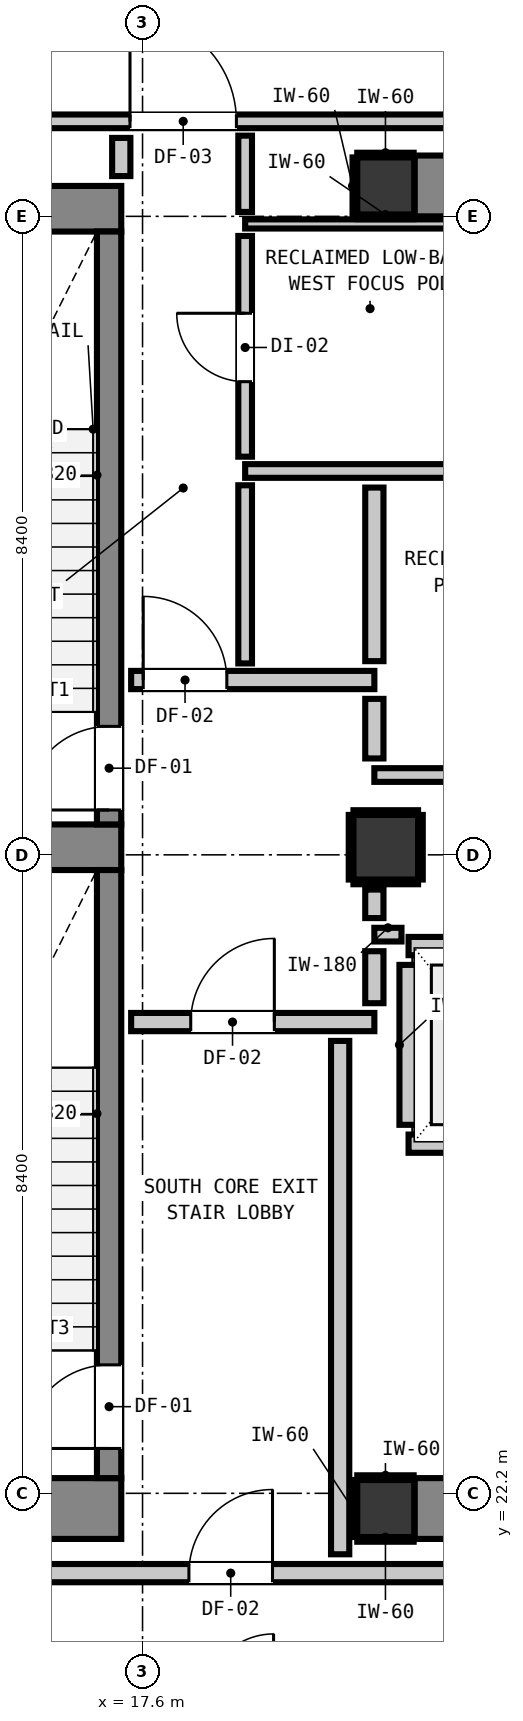
"""IFC4 building model, lengths in metres.
Left out: names, types, materials, properties, quantities, classifications, styles, units other than length and angle.
Written with IfcOpenShell. Run it as: python <this file> out.ifc"""

import sys

from ifc_helpers import new_model, si_unit, direction, frame, frame_2d, origin, origin_2d, place, context, subcontext, project, spatial, rectangle, extrude, element, fill, save


model = new_model("IFC4")
c1 = context("Model", 3, precision=1e-05, world=origin(), true_north=direction((0.0, 1.0)))
c2 = subcontext(c1, "Body", "Model", "MODEL_VIEW")
j1 = project(units=[si_unit("LENGTHUNIT", "METRE"), si_unit("PLANEANGLEUNIT", "RADIAN")], contexts=[c1])
p1 = place(None, origin())
s1 = spatial("IfcSite", under=j1, at=p1, CompositionType="ELEMENT")
p2 = place(p1, origin())
s2 = spatial("IfcBuilding", under=s1, at=p2, CompositionType="ELEMENT")
p3 = place(p2, frame((0.0, 0.0, 226.68)))
s3 = spatial("IfcBuildingStorey", under=s2, at=p3, CompositionType="ELEMENT", Elevation=226.68)
for number, where, z_axis, x_axis in (
    (1, (20.8, 22.0, 0.0), (0.0, 0.0, 1.0), (1.0, 0.0, 0.0)),
    (2, (20.8, 39.4, 0.0), (0.0, 0.0, 1.0), (1.0, 0.0, 0.0)),
):
    element("IfcColumn", number, at=place(p3, frame(where, z_axis=z_axis, x_axis=x_axis)), inside=s3, PredefinedType="COLUMN", context=c2, shape_type="SweptSolid", body=[
        extrude(rectangle(XDim=0.75, YDim=0.75, at=origin_2d()), origin(), (0.0, 0.0, 1.0), 4.6),
    ])
p4 = place(p3, frame((13.24, 22.0, 0.0), z_axis=(0.0, 0.0, 1.0), x_axis=(1.0, 0.0, 0.0)))
e3 = element("IfcWall", 3, at=p4, inside=s3, PredefinedType="SHEAR", context=c2, shape_type="SweptSolid", body=[
    extrude(rectangle(XDim=4.08, YDim=0.8, at=frame_2d((2.04, 0.0))), origin(), (0.0, 0.0, 1.0), 4.6),
])
p5 = place(p3, frame((13.24, 39.1, 0.0), z_axis=(0.0, 0.0, 1.0), x_axis=(1.0, 0.0, 0.0)))
e4 = element("IfcWall", 4, at=p5, inside=s3, PredefinedType="SHEAR", context=c2, shape_type="SweptSolid", body=[
    extrude(rectangle(XDim=4.08, YDim=0.6, at=frame_2d((2.04, 0.0))), origin(), (0.0, 0.0, 1.0), 4.6),
])
p6 = place(p3, frame((13.78, 30.7, 0.0), z_axis=(0.0, 0.0, 1.0), x_axis=(1.0, 0.0, 0.0)))
e5 = element("IfcWall", 5, at=p6, inside=s3, PredefinedType="SHEAR", context=c2, shape_type="SweptSolid", body=[
    extrude(rectangle(XDim=3.54, YDim=0.6, at=frame_2d((1.77, 0.0))), origin(), (0.0, 0.0, 1.0), 4.6),
])
for number, where, z_axis, x_axis in (
    (6, (21.18, 22.0, 0.0), (0.0, 0.0, 1.0), (1.0, 0.0, 0.0)),
    (7, (21.18, 39.4, 0.0), (0.0, 0.0, 1.0), (1.0, 0.0, 0.0)),
):
    element("IfcWall", number, at=place(p3, frame(where, z_axis=z_axis, x_axis=x_axis)), inside=s3, PredefinedType="SHEAR", context=c2, shape_type="SweptSolid", body=[
        extrude(rectangle(XDim=7.64, YDim=0.8, at=frame_2d((3.82, 0.0))), origin(), (0.0, 0.0, 1.0), 4.6),
    ])
p7 = place(p3, frame((17.16, 31.0, 0.0), z_axis=(0.0, 0.0, 1.0), x_axis=(0.0, 1.0, 0.0)))
e8 = element("IfcWall", 8, at=p7, inside=s3, PredefinedType="SHEAR", context=c2, shape_type="SweptSolid", body=[
    extrude(rectangle(XDim=7.8, YDim=0.32, at=frame_2d((3.9, 0.0))), origin(), (0.0, 0.0, 1.0), 4.6),
])
p8 = place(p7, frame((0.19, 0.0, 0.0)))
e9 = element("IfcOpeningElement", 9, at=p8, cuts=e8, PredefinedType="OPENING", context=c2, shape_type="SweptSolid", body=[
    extrude(rectangle(XDim=1.1, YDim=2.15, at=frame_2d((0.55, 1.075))), frame((0.0, 0.17, 0.0), z_axis=(0.0, -1.0, 0.0), x_axis=(1.0, 0.0, 0.0)), (0.0, 0.0, 1.0), 0.34),
])
p9 = place(p3, frame((17.16, 22.4, 0.0), z_axis=(0.0, 0.0, 1.0), x_axis=(0.0, 1.0, 0.0)))
e10 = element("IfcWall", 10, at=p9, inside=s3, PredefinedType="SHEAR", context=c2, shape_type="SweptSolid", body=[
    extrude(rectangle(XDim=8.0, YDim=0.32, at=frame_2d((4.0, 0.0))), origin(), (0.0, 0.0, 1.0), 4.6),
])
p10 = place(p9, frame((0.39, 0.0, 0.0)))
e11 = element("IfcOpeningElement", 11, at=p10, cuts=e10, PredefinedType="OPENING", context=c2, shape_type="SweptSolid", body=[
    extrude(rectangle(XDim=1.1, YDim=2.15, at=frame_2d((0.55, 1.075))), frame((0.0, 0.17, 0.0), z_axis=(0.0, -1.0, 0.0), x_axis=(1.0, 0.0, 0.0)), (0.0, 0.0, 1.0), 0.34),
])
p11 = place(p3, frame((20.8, 30.7, 0.0), z_axis=(0.0, 0.0, 1.0), x_axis=(1.0, 0.0, 0.0)))
e12 = element("IfcColumn", 12, at=p11, inside=s3, PredefinedType="COLUMN", context=c2, shape_type="SweptSolid", body=[
    extrude(rectangle(XDim=0.85, YDim=0.85, at=origin_2d()), origin(), (0.0, 0.0, 1.0), 4.6),
])
for number, where, z_axis, x_axis in (
    (13, (21.1, 26.8, 0.0), (0.0, 0.0, 1.0), (1.0, 0.0, 0.0)),
    (14, (21.1, 29.4, 0.0), (0.0, 0.0, 1.0), (1.0, 0.0, 0.0)),
):
    element("IfcWall", number, at=place(p3, frame(where, z_axis=z_axis, x_axis=x_axis)), inside=s3, PredefinedType="PARTITIONING", context=c2, shape_type="SweptSolid", body=[
        extrude(rectangle(XDim=2.2, YDim=0.24, at=frame_2d((1.1, 0.0))), origin(), (0.0, 0.0, 1.0), 4.18),
    ])
p12 = place(p3, frame((21.1, 27.048, 0.0), z_axis=(0.0, 0.0, 1.0), x_axis=(0.0, 1.0, 0.0)))
e15 = element("IfcWall", 15, at=p12, inside=s3, PredefinedType="PARTITIONING", context=c2, shape_type="SweptSolid", body=[
    extrude(rectangle(XDim=2.104, YDim=0.24, at=frame_2d((1.052, 0.0))), origin(), (0.0, 0.0, 1.0), 2.185),
])
p13 = place(p3, frame((10.787, 21.15, 0.0), z_axis=(0.0, 0.0, 1.0), x_axis=(1.0, 0.0, 0.0)))
e16 = element("IfcWall", 16, at=p13, inside=s3, PredefinedType="PARTITIONING", context=c2, shape_type="SweptSolid", body=[
    extrude(rectangle(XDim=36.626, YDim=0.24, at=frame_2d((18.313, 0.0))), origin(), (0.0, 0.0, 1.0), 4.18),
])
p14 = place(p13, frame((7.423, 0.0, 0.0)))
e17 = element("IfcOpeningElement", 17, at=p14, cuts=e16, PredefinedType="OPENING", context=c2, shape_type="SweptSolid", body=[
    extrude(rectangle(XDim=1.1, YDim=2.15, at=frame_2d((0.55, 1.075))), frame((0.0, 0.13, 0.0), z_axis=(0.0, -1.0, 0.0), x_axis=(1.0, 0.0, 0.0)), (0.0, 0.0, 1.0), 0.26),
])
p15 = place(p13, frame((1.012, 0.0, 0.0)))
e18 = element("IfcOpeningElement", 18, at=p15, cuts=e16, PredefinedType="OPENING", context=c2, shape_type="SweptSolid", body=[
    extrude(rectangle(XDim=1.0, YDim=2.15, at=frame_2d((0.5, 1.075))), frame((0.0, 0.13, 0.0), z_axis=(0.0, -1.0, 0.0), x_axis=(1.0, 0.0, 0.0)), (0.0, 0.0, 1.0), 0.26),
])
p16 = place(p13, frame((27.239, 0.0, 0.0)))
e19 = element("IfcOpeningElement", 19, at=p16, cuts=e16, PredefinedType="OPENING", context=c2, shape_type="SweptSolid", body=[
    extrude(rectangle(XDim=1.4, YDim=2.15, at=frame_2d((0.7, 1.075))), frame((0.0, 0.13, 0.0), z_axis=(0.0, -1.0, 0.0), x_axis=(1.0, 0.0, 0.0)), (0.0, 0.0, 1.0), 0.26),
])
p17 = place(p3, frame((17.45, 28.4, 0.0), z_axis=(0.0, 0.0, 1.0), x_axis=(1.0, 0.0, 0.0)))
e20 = element("IfcWall", 20, at=p17, inside=s3, PredefinedType="PARTITIONING", context=c2, shape_type="SweptSolid", body=[
    extrude(rectangle(XDim=3.2, YDim=0.24, at=frame_2d((1.6, 0.0))), origin(), (0.0, 0.0, 1.0), 4.18),
])
p18 = place(p17, frame((0.784, 0.0, 0.0)))
e21 = element("IfcOpeningElement", 21, at=p18, cuts=e20, PredefinedType="OPENING", context=c2, shape_type="SweptSolid", body=[
    extrude(rectangle(XDim=1.1, YDim=2.15, at=frame_2d((0.55, 1.075))), frame((0.0, 0.13, 0.0), z_axis=(0.0, -1.0, 0.0), x_axis=(1.0, 0.0, 0.0)), (0.0, 0.0, 1.0), 0.26),
])
p19 = place(p3, frame((17.45, 32.9, 0.0), z_axis=(0.0, 0.0, 1.0), x_axis=(1.0, 0.0, 0.0)))
e22 = element("IfcWall", 22, at=p19, inside=s3, PredefinedType="PARTITIONING", context=c2, shape_type="SweptSolid", body=[
    extrude(rectangle(XDim=3.2, YDim=0.24, at=frame_2d((1.6, 0.0))), origin(), (0.0, 0.0, 1.0), 4.18),
])
p20 = place(p19, frame((0.159, 0.0, 0.0)))
e23 = element("IfcOpeningElement", 23, at=p20, cuts=e22, PredefinedType="OPENING", context=c2, shape_type="SweptSolid", body=[
    extrude(rectangle(XDim=1.1, YDim=2.15, at=frame_2d((0.55, 1.075))), frame((0.0, 0.13, 0.0), z_axis=(0.0, -1.0, 0.0), x_axis=(1.0, 0.0, 0.0)), (0.0, 0.0, 1.0), 0.26),
])
p21 = place(p3, frame((20.65, 29.55, 0.0), z_axis=(0.0, 0.0, 1.0), x_axis=(1.0, 0.0, 0.0)))
e24 = element("IfcWall", 24, at=p21, inside=s3, PredefinedType="PARTITIONING", context=c2, shape_type="SweptSolid", body=[
    extrude(rectangle(XDim=0.357, YDim=0.18, at=frame_2d((0.179, 0.0))), origin(), (0.0, 0.0, 1.0), 4.18),
])
p22 = place(p3, frame((20.65, 31.65, 0.0), z_axis=(0.0, 0.0, 1.0), x_axis=(1.0, 0.0, 0.0)))
e25 = element("IfcWall", 25, at=p22, inside=s3, PredefinedType="PARTITIONING", context=c2, shape_type="SweptSolid", body=[
    extrude(rectangle(XDim=7.7, YDim=0.18, at=frame_2d((3.85, 0.0))), origin(), (0.0, 0.0, 1.0), 4.18),
])
p23 = place(p22, frame((1.924, 0.0, 0.0)))
e26 = element("IfcOpeningElement", 26, at=p23, cuts=e25, PredefinedType="OPENING", context=c2, shape_type="SweptSolid", body=[
    extrude(rectangle(XDim=0.9, YDim=2.1, at=frame_2d((0.45, 1.05))), frame((0.0, 0.1, 0.0), z_axis=(0.0, -1.0, 0.0), x_axis=(1.0, 0.0, 0.0)), (0.0, 0.0, 1.0), 0.2),
])
p24 = place(p3, frame((18.95, 35.65, 0.0), z_axis=(0.0, 0.0, 1.0), x_axis=(1.0, 0.0, 0.0)))
e27 = element("IfcWall", 27, at=p24, inside=s3, PredefinedType="PARTITIONING", context=c2, shape_type="SweptSolid", body=[
    extrude(rectangle(XDim=11.025, YDim=0.18, at=frame_2d((5.513, 0.0))), origin(), (0.0, 0.0, 1.0), 4.18),
])
p25 = place(p3, frame((10.787, 40.25, 0.0), z_axis=(0.0, 0.0, 1.0), x_axis=(1.0, 0.0, 0.0)))
e28 = element("IfcWall", 28, at=p25, inside=s3, PredefinedType="PARTITIONING", context=c2, shape_type="SweptSolid", body=[
    extrude(rectangle(XDim=36.626, YDim=0.18, at=frame_2d((18.313, 0.0))), origin(), (0.0, 0.0, 1.0), 4.18),
])
p26 = place(p25, frame((6.648, 0.0, 0.0)))
e29 = element("IfcOpeningElement", 29, at=p26, cuts=e28, PredefinedType="OPENING", context=c2, shape_type="SweptSolid", body=[
    extrude(rectangle(XDim=1.4, YDim=2.15, at=frame_2d((0.7, 1.075))), frame((0.0, 0.1, 0.0), z_axis=(0.0, -1.0, 0.0), x_axis=(1.0, 0.0, 0.0)), (0.0, 0.0, 1.0), 0.2),
])
p27 = place(p25, frame((1.012, 0.0, 0.0)))
e30 = element("IfcOpeningElement", 30, at=p27, cuts=e28, PredefinedType="OPENING", context=c2, shape_type="SweptSolid", body=[
    extrude(rectangle(XDim=1.0, YDim=2.15, at=frame_2d((0.5, 1.075))), frame((0.0, 0.1, 0.0), z_axis=(0.0, -1.0, 0.0), x_axis=(1.0, 0.0, 0.0)), (0.0, 0.0, 1.0), 0.2),
])
p28 = place(p25, frame((27.263, 0.0, 0.0)))
e31 = element("IfcOpeningElement", 31, at=p28, cuts=e28, PredefinedType="OPENING", context=c2, shape_type="SweptSolid", body=[
    extrude(rectangle(XDim=1.4, YDim=2.15, at=frame_2d((0.7, 1.075))), frame((0.0, 0.1, 0.0), z_axis=(0.0, -1.0, 0.0), x_axis=(1.0, 0.0, 0.0)), (0.0, 0.0, 1.0), 0.2),
])
p29 = place(p25, frame((32.289, 0.0, 0.0)))
e32 = element("IfcOpeningElement", 32, at=p29, cuts=e28, PredefinedType="OPENING", context=c2, shape_type="SweptSolid", body=[
    extrude(rectangle(XDim=0.95, YDim=2.1, at=frame_2d((0.475, 1.05))), frame((0.0, 0.1, 0.0), z_axis=(0.0, -1.0, 0.0), x_axis=(1.0, 0.0, 0.0)), (0.0, 0.0, 1.0), 0.2),
])
p30 = place(p3, frame((18.95, 38.9, 0.0), z_axis=(0.0, 0.0, 1.0), x_axis=(1.0, 0.0, 0.0)))
e33 = element("IfcWall", 33, at=p30, inside=s3, PredefinedType="PARTITIONING", context=c2, shape_type="SweptSolid", body=[
    extrude(rectangle(XDim=11.025, YDim=0.12, at=frame_2d((5.513, 0.0))), origin(), (0.0, 0.0, 1.0), 2.185),
])
p31 = place(p3, frame((17.32, 39.53, 0.0), z_axis=(0.0, 0.0, 1.0), x_axis=(0.0, 1.0, 0.0)))
e34 = element("IfcWall", 34, at=p31, inside=s3, PredefinedType="PARTITIONING", context=c2, shape_type="SweptSolid", body=[
    extrude(rectangle(XDim=0.502, YDim=0.24, at=frame_2d((0.251, 0.0))), origin(), (0.0, 0.0, 1.0), 4.18),
])
p32 = place(p3, frame((20.2, 21.398, 0.0), z_axis=(0.0, 0.0, 1.0), x_axis=(0.0, 1.0, 0.0)))
e35 = element("IfcWall", 35, at=p32, inside=s3, PredefinedType="PARTITIONING", context=c2, shape_type="SweptSolid", body=[
    extrude(rectangle(XDim=6.754, YDim=0.24, at=frame_2d((3.377, 0.0))), origin(), (0.0, 0.0, 1.0), 2.185),
])
p33 = place(p3, frame((20.65, 28.648, 0.0), z_axis=(0.0, 0.0, 1.0), x_axis=(0.0, 1.0, 0.0)))
e36 = element("IfcWall", 36, at=p33, inside=s3, PredefinedType="PARTITIONING", context=c2, shape_type="SweptSolid", body=[
    extrude(rectangle(XDim=0.684, YDim=0.24, at=frame_2d((0.342, 0.0))), origin(), (0.0, 0.0, 1.0), 2.185),
])
p34 = place(p3, frame((20.65, 29.768, 0.0), z_axis=(0.0, 0.0, 1.0), x_axis=(0.0, 1.0, 0.0)))
e37 = element("IfcWall", 37, at=p34, inside=s3, PredefinedType="PARTITIONING", context=c2, shape_type="SweptSolid", body=[
    extrude(rectangle(XDim=0.375, YDim=0.24, at=frame_2d((0.188, 0.0))), origin(), (0.0, 0.0, 1.0), 2.185),
])
p35 = place(p3, frame((20.65, 31.868, 0.0), z_axis=(0.0, 0.0, 1.0), x_axis=(0.0, 1.0, 0.0)))
e38 = element("IfcWall", 38, at=p35, inside=s3, PredefinedType="PARTITIONING", context=c2, shape_type="SweptSolid", body=[
    extrude(rectangle(XDim=0.784, YDim=0.24, at=frame_2d((0.392, 0.0))), origin(), (0.0, 0.0, 1.0), 2.185),
])
p36 = place(p3, frame((20.65, 33.148, 0.0), z_axis=(0.0, 0.0, 1.0), x_axis=(0.0, 1.0, 0.0)))
e39 = element("IfcWall", 39, at=p36, inside=s3, PredefinedType="PARTITIONING", context=c2, shape_type="SweptSolid", body=[
    extrude(rectangle(XDim=2.284, YDim=0.24, at=frame_2d((1.142, 0.0))), origin(), (0.0, 0.0, 1.0), 2.185),
])
p37 = place(p3, frame((18.95, 33.118, 0.0), z_axis=(0.0, 0.0, 1.0), x_axis=(0.0, 1.0, 0.0)))
e40 = element("IfcWall", 40, at=p37, inside=s3, PredefinedType="PARTITIONING", context=c2, shape_type="SweptSolid", body=[
    extrude(rectangle(XDim=2.344, YDim=0.18, at=frame_2d((1.172, 0.0))), origin(), (0.0, 0.0, 1.0), 4.18),
])
p38 = place(p3, frame((18.95, 35.838, 0.0), z_axis=(0.0, 0.0, 1.0), x_axis=(0.0, 1.0, 0.0)))
e41 = element("IfcWall", 41, at=p38, inside=s3, PredefinedType="PARTITIONING", context=c2, shape_type="SweptSolid", body=[
    extrude(rectangle(XDim=2.904, YDim=0.18, at=frame_2d((1.452, 0.0))), origin(), (0.0, 0.0, 1.0), 4.18),
])
p39 = place(p38, frame((0.987, 0.0, 0.0)))
e42 = element("IfcOpeningElement", 42, at=p39, cuts=e41, PredefinedType="OPENING", context=c2, shape_type="SweptSolid", body=[
    extrude(rectangle(XDim=0.9, YDim=2.1, at=frame_2d((0.45, 1.05))), frame((0.0, 0.1, 0.0), z_axis=(0.0, -1.0, 0.0), x_axis=(1.0, 0.0, 0.0)), (0.0, 0.0, 1.0), 0.2),
])
p40 = place(p3, frame((18.95, 39.058, 0.0), z_axis=(0.0, 0.0, 1.0), x_axis=(0.0, 1.0, 0.0)))
e43 = element("IfcWall", 43, at=p40, inside=s3, PredefinedType="PARTITIONING", context=c2, shape_type="SweptSolid", body=[
    extrude(rectangle(XDim=1.004, YDim=0.18, at=frame_2d((0.502, 0.0))), origin(), (0.0, 0.0, 1.0), 4.18),
])
for number, where, z_axis, x_axis in (
    (44, (20.425, 21.593, 0.0), (0.0, 0.0, 1.0), (1.0, 0.0, 0.0)),
    (45, (20.425, 22.407, 0.0), (0.0, 0.0, 1.0), (1.0, 0.0, 0.0)),
):
    element("IfcWall", number, at=place(p3, frame(where, z_axis=z_axis, x_axis=x_axis)), inside=s3, PredefinedType="PARTITIONING", context=c2, shape_type="SweptSolid", body=[
        extrude(rectangle(XDim=0.742, YDim=0.06, at=frame_2d((0.371, 0.0))), origin(), (0.0, 0.0, 1.0), 1.45),
    ])
p41 = place(p3, frame((20.393, 21.625, 0.0), z_axis=(0.0, 0.0, 1.0), x_axis=(0.0, 1.0, 0.0)))
e46 = element("IfcWall", 46, at=p41, inside=s3, PredefinedType="PARTITIONING", context=c2, shape_type="SweptSolid", body=[
    extrude(rectangle(XDim=0.75, YDim=0.06, at=frame_2d((0.375, 0.0))), origin(), (0.0, 0.0, 1.0), 1.45),
])
for number, where, z_axis, x_axis in (
    (47, (20.425, 38.993, 0.0), (0.0, 0.0, 1.0), (1.0, 0.0, 0.0)),
    (48, (20.425, 39.807, 0.0), (0.0, 0.0, 1.0), (1.0, 0.0, 0.0)),
):
    element("IfcWall", number, at=place(p3, frame(where, z_axis=z_axis, x_axis=x_axis)), inside=s3, PredefinedType="PARTITIONING", context=c2, shape_type="SweptSolid", body=[
        extrude(rectangle(XDim=0.742, YDim=0.06, at=frame_2d((0.371, 0.0))), origin(), (0.0, 0.0, 1.0), 1.45),
    ])
p42 = place(p3, frame((20.393, 39.025, 0.0), z_axis=(0.0, 0.0, 1.0), x_axis=(0.0, 1.0, 0.0)))
e49 = element("IfcWall", 49, at=p42, inside=s3, PredefinedType="PARTITIONING", context=c2, shape_type="SweptSolid", body=[
    extrude(rectangle(XDim=0.75, YDim=0.06, at=frame_2d((0.375, 0.0))), origin(), (0.0, 0.0, 1.0), 1.45),
])
for number, where, z_axis, x_axis in (
    (50, (20.375, 30.243, 0.0), (0.0, 0.0, 1.0), (1.0, 0.0, 0.0)),
    (51, (20.375, 31.157, 0.0), (0.0, 0.0, 1.0), (1.0, 0.0, 0.0)),
    (52, (20.343, 30.275, 0.0), (0.0, 0.0, 1.0), (0.0, 1.0, 0.0)),
    (53, (21.257, 30.275, 0.0), (0.0, 0.0, 1.0), (0.0, 1.0, 0.0)),
):
    element("IfcWall", number, at=place(p3, frame(where, z_axis=z_axis, x_axis=x_axis)), inside=s3, PredefinedType="PARTITIONING", context=c2, shape_type="SweptSolid", body=[
        extrude(rectangle(XDim=0.85, YDim=0.06, at=frame_2d((0.425, 0.0))), origin(), (0.0, 0.0, 1.0), 1.45),
    ])
p43 = place(p8, origin())
e54 = element("IfcDoor", 54, at=p43, inside=s3, OperationType="SINGLE_SWING_LEFT", PredefinedType="DOOR", context=c2, shape_type="SweptSolid", body=[
    extrude(rectangle(XDim=1.1, YDim=2.15, at=frame_2d((0.55, 1.075))), frame((0.0, 0.025, 0.0), z_axis=(0.0, -1.0, 0.0), x_axis=(1.0, 0.0, 0.0)), (0.0, 0.0, 1.0), 0.05),
])
fill(e9, e54)
p44 = place(p10, origin())
e55 = element("IfcDoor", 55, at=p44, inside=s3, OperationType="SINGLE_SWING_LEFT", PredefinedType="DOOR", context=c2, shape_type="SweptSolid", body=[
    extrude(rectangle(XDim=1.1, YDim=2.15, at=frame_2d((0.55, 1.075))), frame((0.0, 0.025, 0.0), z_axis=(0.0, -1.0, 0.0), x_axis=(1.0, 0.0, 0.0)), (0.0, 0.0, 1.0), 0.05),
])
fill(e11, e55)
p45 = place(p18, origin())
e56 = element("IfcDoor", 56, at=p45, inside=s3, OperationType="SINGLE_SWING_RIGHT", PredefinedType="DOOR", context=c2, shape_type="SweptSolid", body=[
    extrude(rectangle(XDim=1.1, YDim=2.15, at=frame_2d((0.55, 1.075))), frame((0.0, 0.025, 0.0), z_axis=(0.0, -1.0, 0.0), x_axis=(1.0, 0.0, 0.0)), (0.0, 0.0, 1.0), 0.05),
])
fill(e21, e56)
p46 = place(p20, origin())
e57 = element("IfcDoor", 57, at=p46, inside=s3, OperationType="SINGLE_SWING_LEFT", PredefinedType="DOOR", context=c2, shape_type="SweptSolid", body=[
    extrude(rectangle(XDim=1.1, YDim=2.15, at=frame_2d((0.55, 1.075))), frame((0.0, 0.025, 0.0), z_axis=(0.0, -1.0, 0.0), x_axis=(1.0, 0.0, 0.0)), (0.0, 0.0, 1.0), 0.05),
])
fill(e23, e57)
p47 = place(p14, origin())
e58 = element("IfcDoor", 58, at=p47, inside=s3, OperationType="SINGLE_SWING_RIGHT", PredefinedType="DOOR", context=c2, shape_type="SweptSolid", body=[
    extrude(rectangle(XDim=1.1, YDim=2.15, at=frame_2d((0.55, 1.075))), frame((0.0, 0.025, 0.0), z_axis=(0.0, -1.0, 0.0), x_axis=(1.0, 0.0, 0.0)), (0.0, 0.0, 1.0), 0.05),
])
fill(e17, e58)
p48 = place(p26, origin())
e59 = element("IfcDoor", 59, at=p48, inside=s3, OperationType="SINGLE_SWING_LEFT", PredefinedType="DOOR", context=c2, shape_type="SweptSolid", body=[
    extrude(rectangle(XDim=1.4, YDim=2.15, at=frame_2d((0.7, 1.075))), frame((0.0, 0.025, 0.0), z_axis=(0.0, -1.0, 0.0), x_axis=(1.0, 0.0, 0.0)), (0.0, 0.0, 1.0), 0.05),
])
fill(e29, e59)
p49 = place(p39, origin())
e60 = element("IfcDoor", 60, at=p49, inside=s3, OperationType="SINGLE_SWING_RIGHT", PredefinedType="DOOR", context=c2, shape_type="SweptSolid", body=[
    extrude(rectangle(XDim=0.9, YDim=2.1, at=frame_2d((0.45, 1.05))), frame((0.0, 0.025, 0.0), z_axis=(0.0, -1.0, 0.0), x_axis=(1.0, 0.0, 0.0)), (0.0, 0.0, 1.0), 0.05),
])
fill(e42, e60)
save(model, sys.argv[1])
